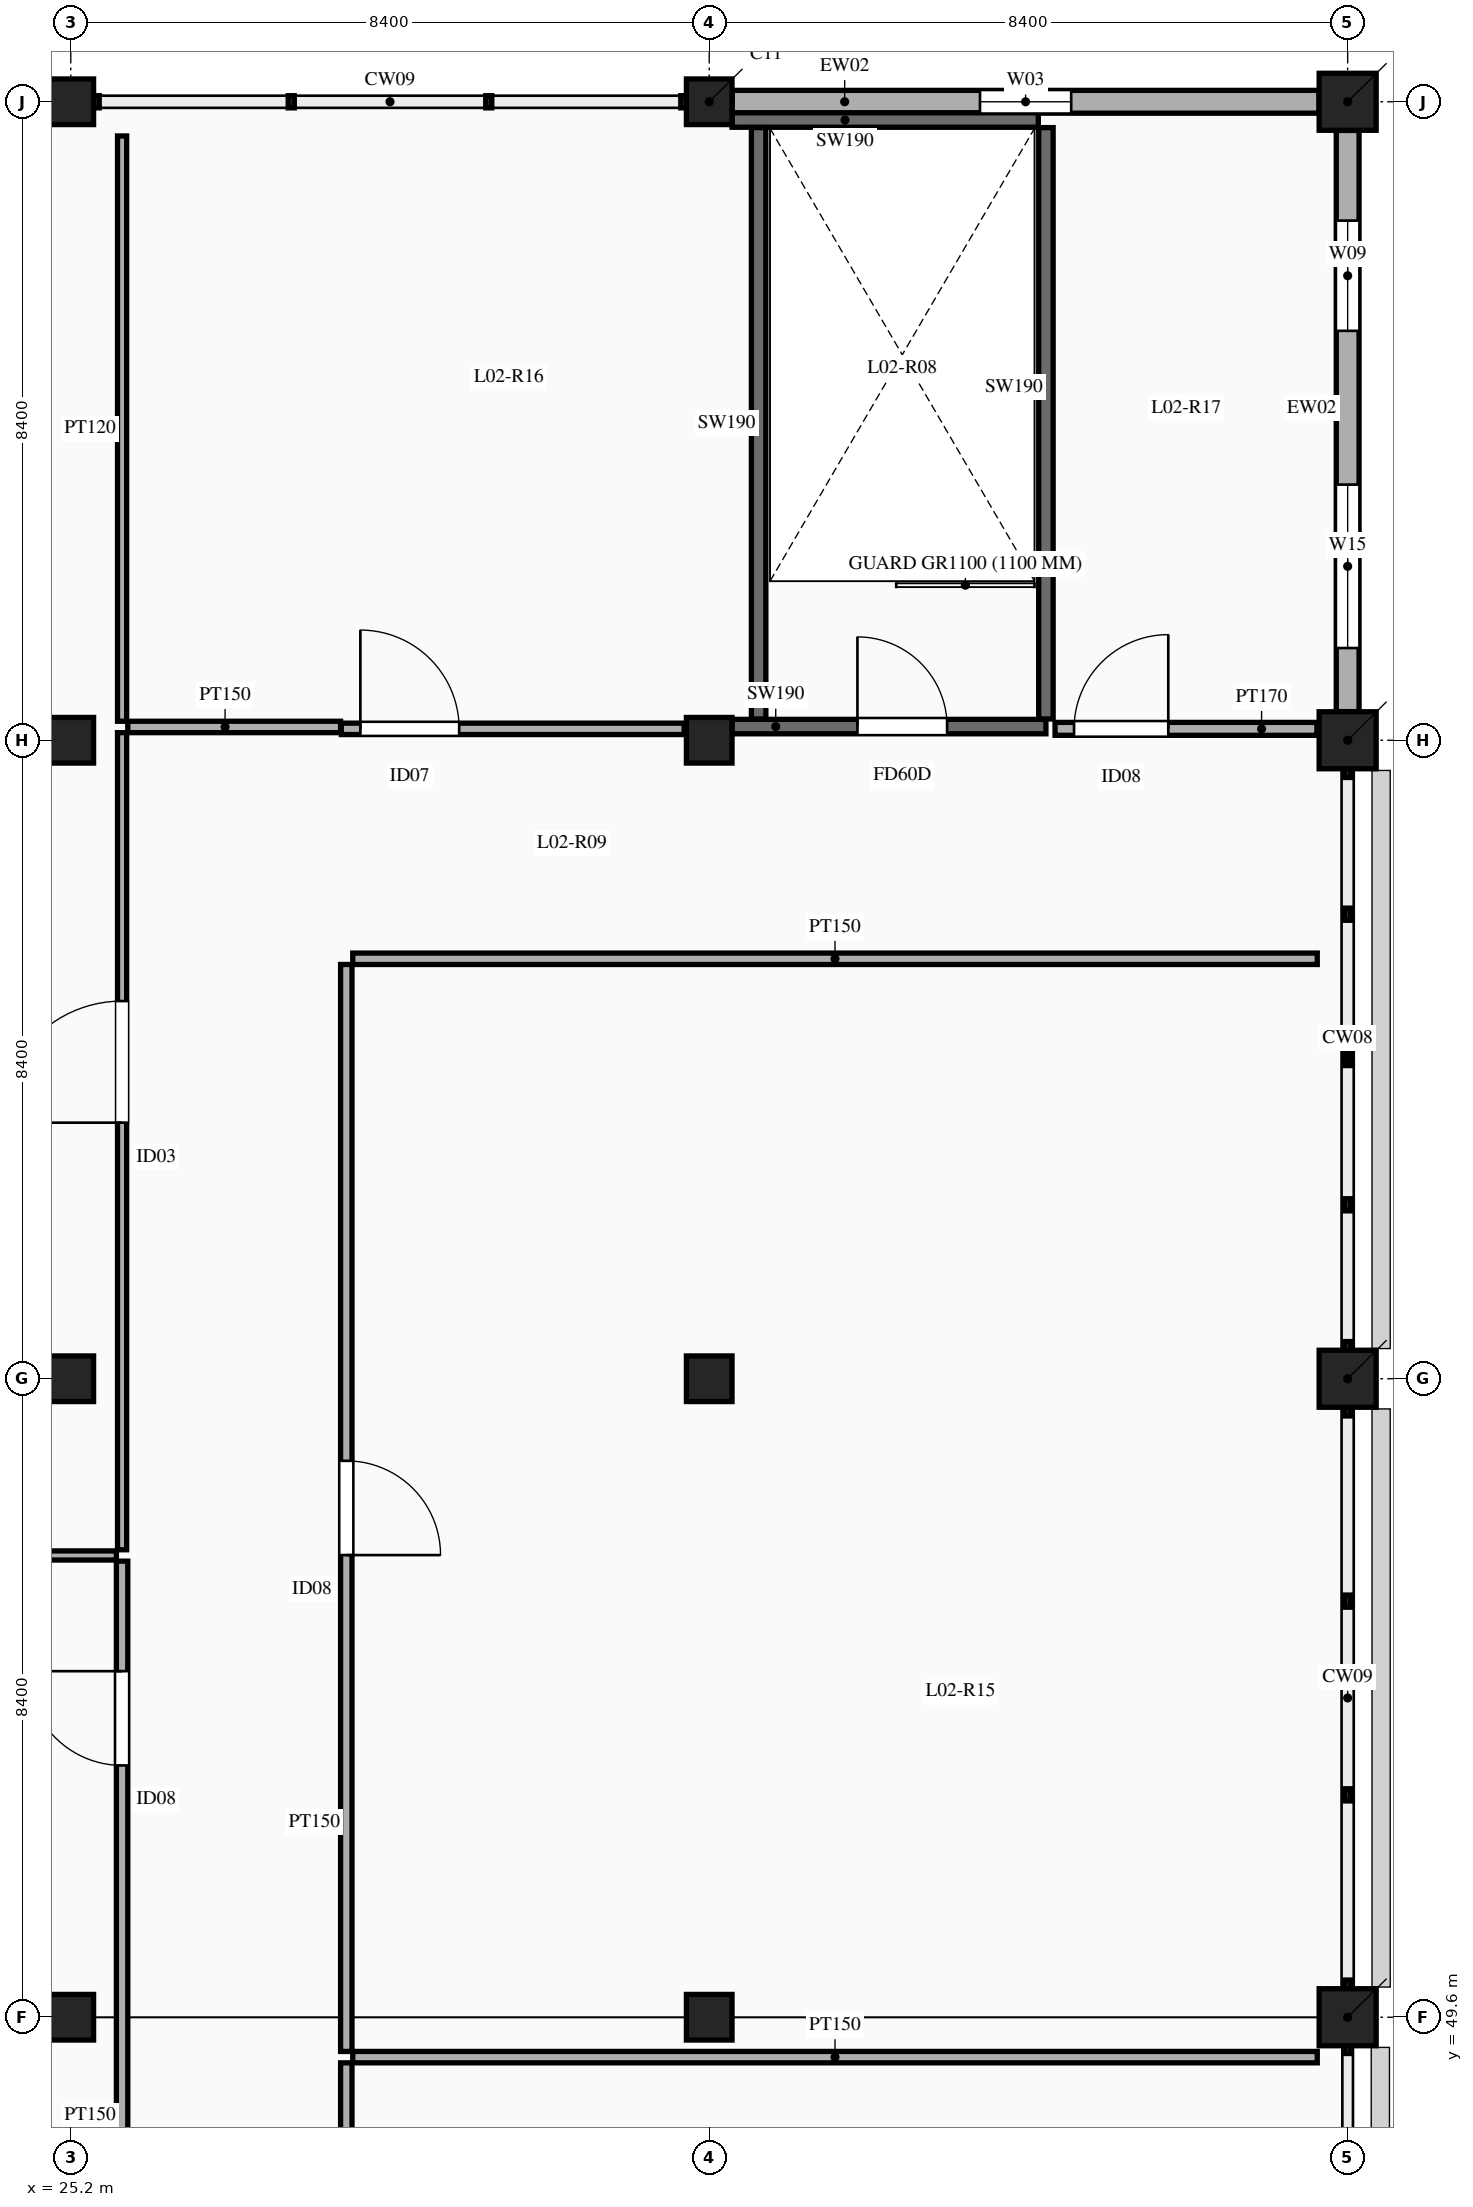
"""IFC4 building model, lengths in metres.
Left out: names, types, materials, properties, quantities, classifications, styles, units other than length and angle.
Written with IfcOpenShell. Run it as: python <this file> out.ifc"""

import sys

from ifc_helpers import new_model, si_unit, direction, frame, frame_2d, origin, origin_2d, place, context, subcontext, project, spatial, rectangle, circle, extrude, element, fill, save


model = new_model("IFC4")
c1 = context("Model", 3, precision=1e-05, world=origin(), true_north=direction((0.0, 1.0)))
c2 = subcontext(c1, "Body", "Model", "MODEL_VIEW")
j1 = project(units=[si_unit("LENGTHUNIT", "METRE"), si_unit("PLANEANGLEUNIT", "RADIAN")], contexts=[c1])
p1 = place(None, origin())
s1 = spatial("IfcSite", under=j1, at=p1, CompositionType="ELEMENT")
p2 = place(p1, origin())
s2 = spatial("IfcBuilding", under=s1, at=p2, CompositionType="ELEMENT")
p3 = place(p2, frame((0.0, 0.0, 10.2)))
s3 = spatial("IfcBuildingStorey", under=s2, at=p3, CompositionType="ELEMENT", Elevation=10.2)
for number, where, z_axis, x_axis in (
    (1, (25.2, 49.6, 0.0), (0.0, 0.0, 1.0), (1.0, 0.0, 0.0)),
    (2, (25.2, 58.0, 0.0), (0.0, 0.0, 1.0), (1.0, 0.0, 0.0)),
    (3, (25.2, 66.4, 0.0), (0.0, 0.0, 1.0), (1.0, 0.0, 0.0)),
    (4, (25.2, 74.8, 0.0), (0.0, 0.0, 1.0), (1.0, 0.0, 0.0)),
    (5, (33.6, 49.6, 0.0), (0.0, 0.0, 1.0), (1.0, 0.0, 0.0)),
    (6, (33.6, 58.0, 0.0), (0.0, 0.0, 1.0), (1.0, 0.0, 0.0)),
    (7, (33.6, 66.4, 0.0), (0.0, 0.0, 1.0), (1.0, 0.0, 0.0)),
    (8, (33.6, 74.8, 0.0), (0.0, 0.0, 1.0), (1.0, 0.0, 0.0)),
):
    element("IfcColumn", number, at=place(p3, frame(where, z_axis=z_axis, x_axis=x_axis)), inside=s3, PredefinedType="COLUMN", context=c2, shape_type="SweptSolid", body=[
        extrude(rectangle(XDim=0.6, YDim=0.6, at=origin_2d()), origin(), (0.0, 0.0, 1.0), 4.8),
    ])
for number, where, z_axis, x_axis in (
    (9, (42.0, 49.6, 0.0), (0.0, 0.0, 1.0), (1.0, 0.0, 0.0)),
    (10, (42.0, 58.0, 0.0), (0.0, 0.0, 1.0), (1.0, 0.0, 0.0)),
    (11, (42.0, 66.4, 0.0), (0.0, 0.0, 1.0), (1.0, 0.0, 0.0)),
    (12, (42.0, 74.8, 0.0), (0.0, 0.0, 1.0), (1.0, 0.0, 0.0)),
):
    element("IfcColumn", number, at=place(p3, frame(where, z_axis=z_axis, x_axis=x_axis)), inside=s3, PredefinedType="COLUMN", context=c2, shape_type="SweptSolid", body=[
        extrude(circle(Radius=0.375, at=origin_2d()), origin(), (0.0, 0.0, 1.0), 4.8),
    ])
p4 = place(p3, frame((33.902, 74.8, 0.0), z_axis=(0.0, 0.0, 1.0), x_axis=(1.0, 0.0, 0.0)))
e13 = element("IfcWall", 13, at=p4, inside=s3, PredefinedType="SOLIDWALL", context=c2, shape_type="SweptSolid", body=[
    extrude(rectangle(XDim=7.721, YDim=0.3, at=frame_2d((3.86, 0.0))), origin(), (0.0, 0.0, 1.0), 3.85),
])
p5 = place(p4, frame((3.26, 0.0, 1.1)))
e14 = element("IfcOpeningElement", 14, at=p5, cuts=e13, PredefinedType="OPENING", context=c2, shape_type="SweptSolid", body=[
    extrude(rectangle(XDim=1.2, YDim=1.2, at=frame_2d((0.6, 0.6))), frame((0.0, 0.16, 0.0), z_axis=(0.0, -1.0, 0.0), x_axis=(1.0, 0.0, 0.0)), (0.0, 0.0, 1.0), 0.32),
])
p6 = place(p3, frame((42.0, 66.777, 0.0), z_axis=(0.0, 0.0, 1.0), x_axis=(0.0, 1.0, 0.0)))
e15 = element("IfcWall", 15, at=p6, inside=s3, PredefinedType="SOLIDWALL", context=c2, shape_type="SweptSolid", body=[
    extrude(rectangle(XDim=7.646, YDim=0.3, at=frame_2d((3.823, 0.0))), origin(), (0.0, 0.0, 1.0), 3.85),
])
p7 = place(p6, frame((0.836, 0.0, 1.1)))
e16 = element("IfcOpeningElement", 16, at=p7, cuts=e15, PredefinedType="OPENING", context=c2, shape_type="SweptSolid", body=[
    extrude(rectangle(XDim=2.15, YDim=2.15, at=frame_2d((1.075, 1.075))), frame((0.0, 0.16, 0.0), z_axis=(0.0, -1.0, 0.0), x_axis=(1.0, 0.0, 0.0)), (0.0, 0.0, 1.0), 0.32),
])
p8 = place(p6, frame((5.01, 0.0, 0.9)))
e17 = element("IfcOpeningElement", 17, at=p8, cuts=e15, PredefinedType="OPENING", context=c2, shape_type="SweptSolid", body=[
    extrude(rectangle(XDim=1.45, YDim=1.8, at=frame_2d((0.725, 0.9))), frame((0.0, 0.16, 0.0), z_axis=(0.0, -1.0, 0.0), x_axis=(1.0, 0.0, 0.0)), (0.0, 0.0, 1.0), 0.32),
])
p9 = place(p3, frame((33.9, 66.58, 0.0), z_axis=(0.0, 0.0, 1.0), x_axis=(1.0, 0.0, 0.0)))
e18 = element("IfcWall", 18, at=p9, inside=s3, PredefinedType="SOLIDWALL", context=c2, shape_type="SweptSolid", body=[
    extrude(rectangle(XDim=4.13, YDim=0.19, at=frame_2d((2.065, 0.0))), origin(), (0.0, 0.0, 1.0), 4.55),
])
p10 = place(p9, frame((1.65, 0.0, 0.0)))
e19 = element("IfcOpeningElement", 19, at=p10, cuts=e18, PredefinedType="OPENING", context=c2, shape_type="SweptSolid", body=[
    extrude(rectangle(XDim=1.18, YDim=2.15, at=frame_2d((0.59, 1.075))), frame((0.0, 0.105, 0.0), z_axis=(0.0, -1.0, 0.0), x_axis=(1.0, 0.0, 0.0)), (0.0, 0.0, 1.0), 0.21),
])
p11 = place(p3, frame((33.9, 74.56, 0.0), z_axis=(0.0, 0.0, 1.0), x_axis=(1.0, 0.0, 0.0)))
e20 = element("IfcWall", 20, at=p11, inside=s3, PredefinedType="SOLIDWALL", context=c2, shape_type="SweptSolid", body=[
    extrude(rectangle(XDim=4.03, YDim=0.19, at=frame_2d((2.015, 0.0))), origin(), (0.0, 0.0, 1.0), 4.55),
])
for number, where, z_axis, x_axis in (
    (21, (34.25, 66.68, 0.0), (0.0, 0.0, 1.0), (0.0, 1.0, 0.0)),
    (22, (38.03, 66.68, 0.0), (0.0, 0.0, 1.0), (0.0, 1.0, 0.0)),
):
    element("IfcWall", number, at=place(p3, frame(where, z_axis=z_axis, x_axis=x_axis)), inside=s3, PredefinedType="SOLIDWALL", context=c2, shape_type="SweptSolid", body=[
        extrude(rectangle(XDim=7.78, YDim=0.19, at=frame_2d((3.89, 0.0))), origin(), (0.0, 0.0, 1.0), 4.55),
    ])
p12 = place(p3, frame((25.875, 36.95, 0.0), z_axis=(0.0, 0.0, 1.0), x_axis=(0.0, 1.0, 0.0)))
e23 = element("IfcWall", 23, at=p12, inside=s3, PredefinedType="PARTITIONING", context=c2, shape_type="SweptSolid", body=[
    extrude(rectangle(XDim=18.65, YDim=0.15, at=frame_2d((9.325, 0.0))), origin(), (0.0, 0.0, 1.0), 3.75),
])
p13 = place(p12, frame((15.963, 0.0, 0.0)))
e24 = element("IfcOpeningElement", 24, at=p13, cuts=e23, PredefinedType="OPENING", context=c2, shape_type="SweptSolid", body=[
    extrude(rectangle(XDim=1.24, YDim=2.2, at=frame_2d((0.62, 1.1))), frame((0.0, 0.085, 0.0), z_axis=(0.0, -1.0, 0.0), x_axis=(1.0, 0.0, 0.0)), (0.0, 0.0, 1.0), 0.17),
])
p14 = place(p3, frame((25.875, 55.75, 0.0), z_axis=(0.0, 0.0, 1.0), x_axis=(0.0, 1.0, 0.0)))
e25 = element("IfcWall", 25, at=p14, inside=s3, PredefinedType="PARTITIONING", context=c2, shape_type="SweptSolid", body=[
    extrude(rectangle(XDim=10.75, YDim=0.12, at=frame_2d((5.375, 0.0))), origin(), (0.0, 0.0, 1.0), 3.75),
])
p15 = place(p14, frame((5.619, 0.0, 0.0)))
e26 = element("IfcOpeningElement", 26, at=p15, cuts=e25, PredefinedType="OPENING", context=c2, shape_type="SweptSolid", body=[
    extrude(rectangle(XDim=1.6, YDim=2.35, at=frame_2d((0.8, 1.175))), frame((0.0, 0.07, 0.0), z_axis=(0.0, -1.0, 0.0), x_axis=(1.0, 0.0, 0.0)), (0.0, 0.0, 1.0), 0.14),
])
p16 = place(p3, frame((28.825, 34.302, 0.0), z_axis=(0.0, 0.0, 1.0), x_axis=(0.0, 1.0, 0.0)))
e27 = element("IfcWall", 27, at=p16, inside=s3, PredefinedType="PARTITIONING", context=c2, shape_type="SweptSolid", body=[
    extrude(rectangle(XDim=14.698, YDim=0.15, at=frame_2d((7.349, 0.0))), origin(), (0.0, 0.0, 1.0), 3.75),
])
p17 = place(p16, frame((6.729, 0.0, 0.0)))
e28 = element("IfcOpeningElement", 28, at=p17, cuts=e27, PredefinedType="OPENING", context=c2, shape_type="SweptSolid", body=[
    extrude(rectangle(XDim=1.24, YDim=2.2, at=frame_2d((0.62, 1.1))), frame((0.0, 0.085, 0.0), z_axis=(0.0, -1.0, 0.0), x_axis=(1.0, 0.0, 0.0)), (0.0, 0.0, 1.0), 0.17),
])
p18 = place(p3, frame((28.825, 49.15, 0.0), z_axis=(0.0, 0.0, 1.0), x_axis=(0.0, 1.0, 0.0)))
e29 = element("IfcWall", 29, at=p18, inside=s3, PredefinedType="PARTITIONING", context=c2, shape_type="SweptSolid", body=[
    extrude(rectangle(XDim=14.3, YDim=0.15, at=frame_2d((7.15, 0.0))), origin(), (0.0, 0.0, 1.0), 3.75),
])
p19 = place(p18, frame((6.53, 0.0, 0.0)))
e30 = element("IfcOpeningElement", 30, at=p19, cuts=e29, PredefinedType="OPENING", context=c2, shape_type="SweptSolid", body=[
    extrude(rectangle(XDim=1.24, YDim=2.2, at=frame_2d((0.62, 1.1))), frame((0.0, 0.085, 0.0), z_axis=(0.0, -1.0, 0.0), x_axis=(1.0, 0.0, 0.0)), (0.0, 0.0, 1.0), 0.17),
])
p20 = place(p3, frame((25.95, 66.575, 0.0), z_axis=(0.0, 0.0, 1.0), x_axis=(1.0, 0.0, 0.0)))
e31 = element("IfcWall", 31, at=p20, inside=s3, PredefinedType="PARTITIONING", context=c2, shape_type="SweptSolid", body=[
    extrude(rectangle(XDim=2.8, YDim=0.15, at=frame_2d((1.4, 0.0))), origin(), (0.0, 0.0, 1.0), 3.75),
])
p21 = place(p3, frame((28.91, 63.525, 0.0), z_axis=(0.0, 0.0, 1.0), x_axis=(1.0, 0.0, 0.0)))
e32 = element("IfcWall", 32, at=p21, inside=s3, PredefinedType="PARTITIONING", context=c2, shape_type="SweptSolid", body=[
    extrude(rectangle(XDim=12.69, YDim=0.15, at=frame_2d((6.345, 0.0))), origin(), (0.0, 0.0, 1.0), 3.75),
])
p22 = place(p3, frame((28.76, 66.55, 0.0), z_axis=(0.0, 0.0, 1.0), x_axis=(1.0, 0.0, 0.0)))
e33 = element("IfcWall", 33, at=p22, inside=s3, PredefinedType="PARTITIONING", context=c2, shape_type="SweptSolid", body=[
    extrude(rectangle(XDim=4.51, YDim=0.15, at=frame_2d((2.255, 0.0))), origin(), (0.0, 0.0, 1.0), 3.75),
])
p23 = place(p22, frame((0.25, 0.0, 0.0)))
e34 = element("IfcOpeningElement", 34, at=p23, cuts=e33, PredefinedType="OPENING", context=c2, shape_type="SweptSolid", body=[
    extrude(rectangle(XDim=1.3, YDim=2.25, at=frame_2d((0.65, 1.125))), frame((0.0, 0.085, 0.0), z_axis=(0.0, -1.0, 0.0), x_axis=(1.0, 0.0, 0.0)), (0.0, 0.0, 1.0), 0.17),
])
p24 = place(p3, frame((38.15, 66.55, 0.0), z_axis=(0.0, 0.0, 1.0), x_axis=(1.0, 0.0, 0.0)))
e35 = element("IfcWall", 35, at=p24, inside=s3, PredefinedType="PARTITIONING", context=c2, shape_type="SweptSolid", body=[
    extrude(rectangle(XDim=3.445, YDim=0.17, at=frame_2d((1.723, 0.0))), origin(), (0.0, 0.0, 1.0), 3.75),
])
p25 = place(p24, frame((0.25, 0.0, 0.0)))
e36 = element("IfcOpeningElement", 36, at=p25, cuts=e35, PredefinedType="OPENING", context=c2, shape_type="SweptSolid", body=[
    extrude(rectangle(XDim=1.24, YDim=2.2, at=frame_2d((0.62, 1.1))), frame((0.0, 0.095, 0.0), z_axis=(0.0, -1.0, 0.0), x_axis=(1.0, 0.0, 0.0)), (0.0, 0.0, 1.0), 0.19),
])
p26 = place(p3, frame((8.85, 55.675, 0.0), z_axis=(0.0, 0.0, 1.0), x_axis=(1.0, 0.0, 0.0)))
e37 = element("IfcWall", 37, at=p26, inside=s3, PredefinedType="PARTITIONING", context=c2, shape_type="SweptSolid", body=[
    extrude(rectangle(XDim=16.95, YDim=0.12, at=frame_2d((8.475, 0.0))), origin(), (0.0, 0.0, 1.0), 3.75),
])
p27 = place(p3, frame((25.875, 66.65, 0.0), z_axis=(0.0, 0.0, 1.0), x_axis=(0.0, 1.0, 0.0)))
e38 = element("IfcWall", 38, at=p27, inside=s3, PredefinedType="PARTITIONING", context=c2, shape_type="SweptSolid", body=[
    extrude(rectangle(XDim=7.7, YDim=0.12, at=frame_2d((3.85, 0.0))), origin(), (0.0, 0.0, 1.0), 3.75),
])
p28 = place(p3, frame((28.91, 49.075, 0.0), z_axis=(0.0, 0.0, 1.0), x_axis=(1.0, 0.0, 0.0)))
e39 = element("IfcWall", 39, at=p28, inside=s3, PredefinedType="PARTITIONING", context=c2, shape_type="SweptSolid", body=[
    extrude(rectangle(XDim=12.69, YDim=0.15, at=frame_2d((6.345, 0.0))), origin(), (0.0, 0.0, 1.0), 3.75),
])
p29 = place(p5, origin())
e40 = element("IfcWindow", 40, at=p29, inside=s3, PartitioningType="SINGLE_PANEL", PredefinedType="WINDOW", context=c2, shape_type="SweptSolid", body=[
    extrude(rectangle(XDim=1.2, YDim=1.2, at=frame_2d((0.6, 0.6))), frame((0.0, 0.03, 0.0), z_axis=(0.0, -1.0, 0.0), x_axis=(1.0, 0.0, 0.0)), (0.0, 0.0, 1.0), 0.06),
])
fill(e14, e40)
p30 = place(p7, origin())
e41 = element("IfcWindow", 41, at=p30, inside=s3, PartitioningType="TRIPLE_PANEL_VERTICAL", PredefinedType="WINDOW", context=c2, shape_type="SweptSolid", body=[
    extrude(rectangle(XDim=2.15, YDim=2.15, at=frame_2d((1.075, 1.075))), frame((0.0, 0.03, 0.0), z_axis=(0.0, -1.0, 0.0), x_axis=(1.0, 0.0, 0.0)), (0.0, 0.0, 1.0), 0.06),
])
fill(e16, e41)
p31 = place(p8, origin())
e42 = element("IfcWindow", 42, at=p31, inside=s3, PartitioningType="DOUBLE_PANEL_HORIZONTAL", PredefinedType="WINDOW", context=c2, shape_type="SweptSolid", body=[
    extrude(rectangle(XDim=1.45, YDim=1.8, at=frame_2d((0.725, 0.9))), frame((0.0, 0.03, 0.0), z_axis=(0.0, -1.0, 0.0), x_axis=(1.0, 0.0, 0.0)), (0.0, 0.0, 1.0), 0.06),
])
fill(e17, e42)
p32 = place(p10, origin())
e43 = element("IfcDoor", 43, at=p32, inside=s3, OperationType="SINGLE_SWING_LEFT", PredefinedType="DOOR", context=c2, shape_type="SweptSolid", body=[
    extrude(rectangle(XDim=1.18, YDim=2.15, at=frame_2d((0.59, 1.075))), frame((0.0, 0.025, 0.0), z_axis=(0.0, -1.0, 0.0), x_axis=(1.0, 0.0, 0.0)), (0.0, 0.0, 1.0), 0.05),
])
fill(e19, e43)
p33 = place(p13, origin())
e44 = element("IfcDoor", 44, at=p33, inside=s3, OperationType="SINGLE_SWING_RIGHT", PredefinedType="DOOR", context=c2, shape_type="SweptSolid", body=[
    extrude(rectangle(XDim=1.24, YDim=2.2, at=frame_2d((0.62, 1.1))), frame((0.0, 0.025, 0.0), z_axis=(0.0, -1.0, 0.0), x_axis=(1.0, 0.0, 0.0)), (0.0, 0.0, 1.0), 0.05),
])
fill(e24, e44)
p34 = place(p15, origin())
e45 = element("IfcDoor", 45, at=p34, inside=s3, OperationType="SINGLE_SWING_LEFT", PredefinedType="DOOR", context=c2, shape_type="SweptSolid", body=[
    extrude(rectangle(XDim=1.6, YDim=2.35, at=frame_2d((0.8, 1.175))), frame((0.0, 0.025, 0.0), z_axis=(0.0, -1.0, 0.0), x_axis=(1.0, 0.0, 0.0)), (0.0, 0.0, 1.0), 0.05),
])
fill(e26, e45)
p35 = place(p19, frame((1.24, 0.0, 0.0), z_axis=(0.0, 0.0, 1.0), x_axis=(-1.0, 0.0, 0.0)))
e46 = element("IfcDoor", 46, at=p35, inside=s3, OperationType="SINGLE_SWING_RIGHT", PredefinedType="DOOR", context=c2, shape_type="SweptSolid", body=[
    extrude(rectangle(XDim=1.24, YDim=2.2, at=frame_2d((0.62, 1.1))), frame((0.0, 0.025, 0.0), z_axis=(0.0, -1.0, 0.0), x_axis=(1.0, 0.0, 0.0)), (0.0, 0.0, 1.0), 0.05),
])
fill(e30, e46)
p36 = place(p23, origin())
e47 = element("IfcDoor", 47, at=p36, inside=s3, OperationType="SINGLE_SWING_LEFT", PredefinedType="DOOR", context=c2, shape_type="SweptSolid", body=[
    extrude(rectangle(XDim=1.3, YDim=2.25, at=frame_2d((0.65, 1.125))), frame((0.0, 0.025, 0.0), z_axis=(0.0, -1.0, 0.0), x_axis=(1.0, 0.0, 0.0)), (0.0, 0.0, 1.0), 0.05),
])
fill(e34, e47)
p37 = place(p25, origin())
e48 = element("IfcDoor", 48, at=p37, inside=s3, OperationType="SINGLE_SWING_RIGHT", PredefinedType="DOOR", context=c2, shape_type="SweptSolid", body=[
    extrude(rectangle(XDim=1.24, YDim=2.2, at=frame_2d((0.62, 1.1))), frame((0.0, 0.025, 0.0), z_axis=(0.0, -1.0, 0.0), x_axis=(1.0, 0.0, 0.0)), (0.0, 0.0, 1.0), 0.05),
])
fill(e36, e48)
save(model, sys.argv[1])
